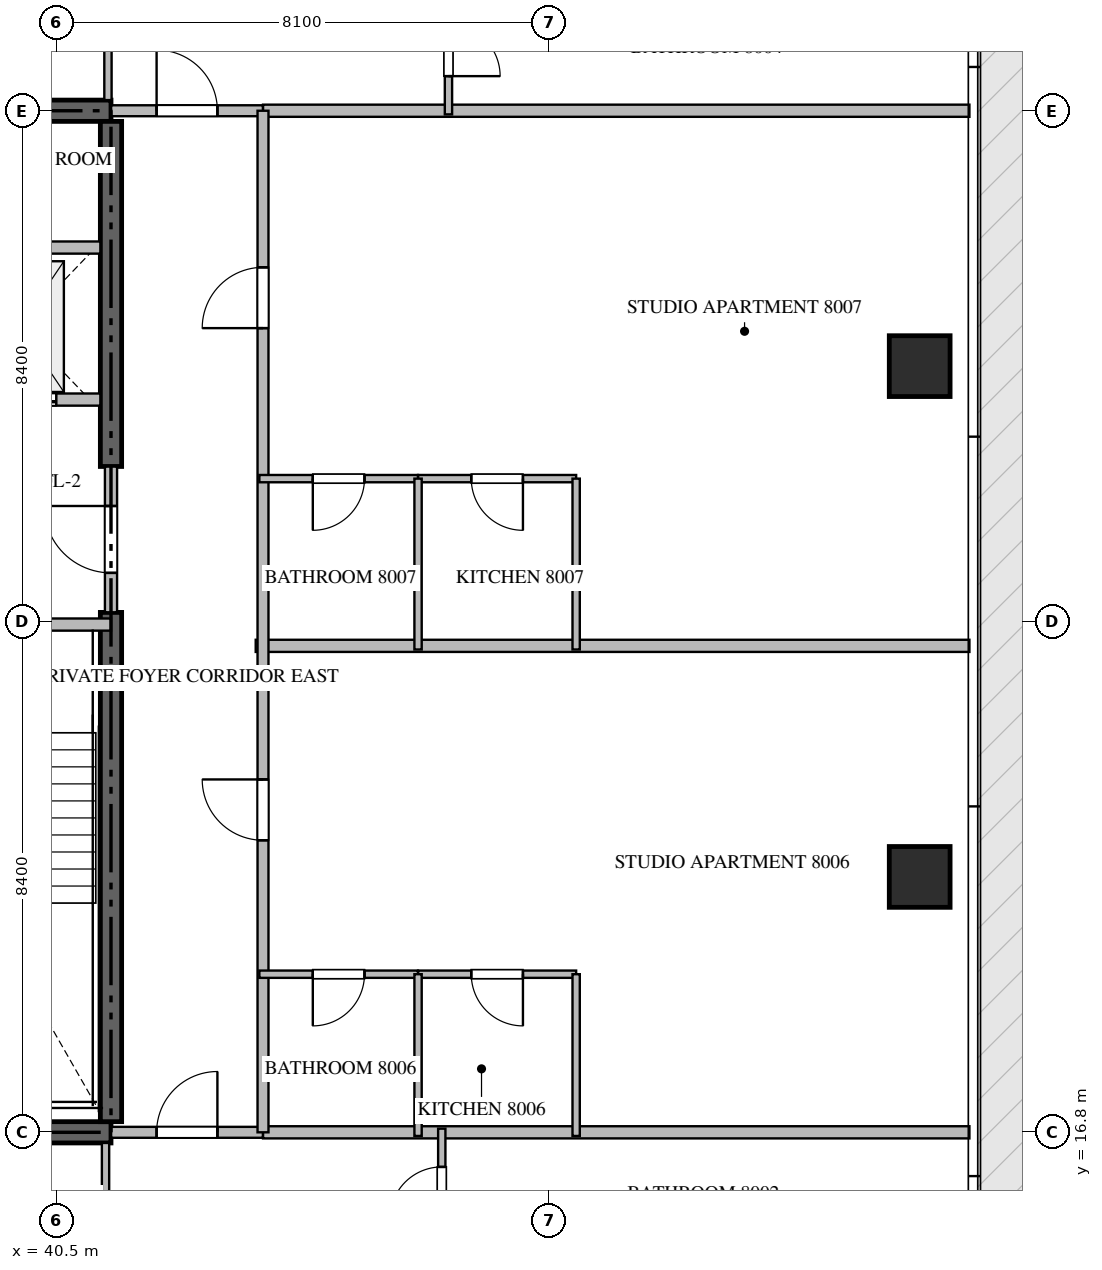
"""IFC4 building model, lengths in metres.
Left out: names, types, materials, properties, quantities, classifications, styles, units other than length and angle.
Written with IfcOpenShell. Run it as: python <this file> out.ifc"""

import sys

from ifc_helpers import new_model, si_unit, direction, frame, frame_2d, origin, origin_2d, place, context, subcontext, project, spatial, rectangle, extrude, source, transform, mapped, element, fill, save


model = new_model("IFC4")
c1 = context("Model", 3, precision=1e-05, world=origin(), true_north=direction((0.0, 1.0)))
c2 = subcontext(c1, "Body", "Model", "MODEL_VIEW")
j1 = project(units=[si_unit("LENGTHUNIT", "METRE"), si_unit("PLANEANGLEUNIT", "RADIAN")], contexts=[c1])
p1 = place(None, origin())
s1 = spatial("IfcSite", under=j1, at=p1, CompositionType="ELEMENT")
p2 = place(p1, origin())
s2 = spatial("IfcBuilding", under=s1, at=p2, CompositionType="ELEMENT")
p3 = place(p2, frame((0.0, 0.0, 321.8)))
s3 = spatial("IfcBuildingStorey", under=s2, at=p3, CompositionType="ELEMENT", Elevation=321.8)
for number, where, z_axis, x_axis in (
    (1, (23.4, 16.8, -0.26), (0.0, 0.0, 1.0), (1.0, 0.0, 0.0)),
    (2, (41.4, 33.6, -0.26), (0.0, 0.0, 1.0), (-1.0, 0.0, 0.0)),
):
    element("IfcWall", number, at=place(p3, frame(where, z_axis=z_axis, x_axis=x_axis)), inside=s3, PredefinedType="SHEAR", context=c2, shape_type="SweptSolid", body=[
        extrude(rectangle(XDim=18.0, YDim=0.35, at=frame_2d((9.0, 0.0))), origin(), (0.0, 0.0, 1.0), 4.048),
    ])
p4 = place(p3, frame((41.4, 16.975, -0.26), z_axis=(0.0, 0.0, 1.0), x_axis=(0.0, 1.0, 0.0)))
e3 = element("IfcWall", 3, at=p4, inside=s3, PredefinedType="SHEAR", context=c2, shape_type="SweptSolid", body=[
    extrude(rectangle(XDim=8.375, YDim=0.35, at=frame_2d((4.188, 0.0))), origin(), (0.0, 0.0, 1.0), 4.048),
])
p5 = place(p3, frame((41.4, 27.75, -0.26), z_axis=(0.0, 0.0, 1.0), x_axis=(0.0, 1.0, 0.0)))
e4 = element("IfcWall", 4, at=p5, inside=s3, PredefinedType="SHEAR", context=c2, shape_type="SweptSolid", body=[
    extrude(rectangle(XDim=5.675, YDim=0.35, at=frame_2d((2.837, 0.0))), origin(), (0.0, 0.0, 1.0), 4.048),
])
m1 = source(origin(), c2, "Body", "SweptSolid", [
    extrude(rectangle(XDim=1.0, YDim=1.0, at=origin_2d()), origin(), (0.0, 0.0, 1.0), 4.05),
])
for number, where, z_axis, x_axis in (
    (5, (54.7, 21.0, -0.26), (0.0, 0.0, 1.0), (1.0, 0.0, 0.0)),
    (6, (54.7, 29.4, -0.26), (0.0, 0.0, 1.0), (1.0, 0.0, 0.0)),
):
    element("IfcColumn", number, at=place(p3, frame(where, z_axis=z_axis, x_axis=x_axis)), inside=s3, PredefinedType="COLUMN", context=c2, shape_type="MappedRepresentation", body=[
        mapped(m1, transform((0.0, 0.0, 0.0), scale=1.0)),
    ])
p6 = place(p3, frame((36.95, 25.15, 0.0), z_axis=(0.0, 0.0, 1.0), x_axis=(1.0, 0.0, 0.0)))
e7 = element("IfcWall", 7, at=p6, inside=s3, PredefinedType="STANDARD", context=c2, shape_type="SweptSolid", body=[
    extrude(rectangle(XDim=4.45, YDim=0.2, at=frame_2d((2.225, 0.0))), origin(), (0.0, 0.0, 1.0), 3.79),
])
p7 = place(p6, frame((1.65, 0.0, 0.0)))
e8 = element("IfcOpeningElement", 8, at=p7, cuts=e7, PredefinedType="OPENING", context=c2, shape_type="SweptSolid", body=[
    extrude(rectangle(XDim=1.1, YDim=2.15, at=frame_2d((0.55, 1.075))), frame((0.0, 0.11, 0.0), z_axis=(0.0, -1.0, 0.0), x_axis=(1.0, 0.0, 0.0)), (0.0, 0.0, 1.0), 0.22),
])
p8 = place(p3, frame((38.75, 28.85, 0.0), z_axis=(0.0, 0.0, 1.0), x_axis=(1.0, 0.0, 0.0)))
e9 = element("IfcWall", 9, at=p8, inside=s3, PredefinedType="STANDARD", context=c2, shape_type="SweptSolid", body=[
    extrude(rectangle(XDim=2.475, YDim=0.2, at=frame_2d((1.238, 0.0))), origin(), (0.0, 0.0, 1.0), 3.79),
])
p9 = place(p8, frame((0.55, 0.0, 0.0)))
e10 = element("IfcOpeningElement", 10, at=p9, cuts=e9, PredefinedType="OPENING", context=c2, shape_type="SweptSolid", body=[
    extrude(rectangle(XDim=1.2, YDim=2.2, at=frame_2d((0.6, 1.1))), frame((0.0, 0.11, 0.0), z_axis=(0.0, -1.0, 0.0), x_axis=(1.0, 0.0, 0.0)), (0.0, 0.0, 1.0), 0.22),
])
p10 = place(p3, frame((38.75, 31.35, 0.0), z_axis=(0.0, 0.0, 1.0), x_axis=(1.0, 0.0, 0.0)))
e11 = element("IfcWall", 11, at=p10, inside=s3, PredefinedType="STANDARD", context=c2, shape_type="SweptSolid", body=[
    extrude(rectangle(XDim=2.475, YDim=0.2, at=frame_2d((1.238, 0.0))), origin(), (0.0, 0.0, 1.0), 3.79),
])
p11 = place(p3, frame((41.4, 25.352, 0.0), z_axis=(0.0, 0.0, 1.0), x_axis=(0.0, 1.0, 0.0)))
e12 = element("IfcWall", 12, at=p11, inside=s3, PredefinedType="STANDARD", context=c2, shape_type="SweptSolid", body=[
    extrude(rectangle(XDim=2.396, YDim=0.2, at=frame_2d((1.198, 0.0))), origin(), (0.0, 0.0, 1.0), 3.79),
])
p12 = place(p11, frame((0.648, 0.0, 0.0)))
e13 = element("IfcOpeningElement", 13, at=p12, cuts=e12, PredefinedType="OPENING", context=c2, shape_type="SweptSolid", body=[
    extrude(rectangle(XDim=1.1, YDim=2.15, at=frame_2d((0.55, 1.075))), frame((0.0, 0.11, 0.0), z_axis=(0.0, -1.0, 0.0), x_axis=(1.0, 0.0, 0.0)), (0.0, 0.0, 1.0), 0.22),
])
p13 = place(p3, frame((43.78, 24.8, 0.0), z_axis=(0.0, 0.0, 1.0), x_axis=(1.0, 0.0, 0.0)))
e14 = element("IfcWall", 14, at=p13, inside=s3, PredefinedType="PARTITIONING", context=c2, shape_type="SweptSolid", body=[
    extrude(rectangle(XDim=11.738, YDim=0.2, at=frame_2d((5.869, 0.0))), origin(), (0.0, 0.0, 1.0), 3.79),
])
for number, where, z_axis, x_axis in (
    (15, (43.9, 16.8, 0.0), (0.0, 0.0, 1.0), (1.0, 0.0, 0.0)),
    (16, (43.9, 33.6, 0.0), (0.0, 0.0, 1.0), (1.0, 0.0, 0.0)),
):
    element("IfcWall", number, at=place(p3, frame(where, z_axis=z_axis, x_axis=x_axis)), inside=s3, PredefinedType="PARTITIONING", context=c2, shape_type="SweptSolid", body=[
        extrude(rectangle(XDim=11.618, YDim=0.2, at=frame_2d((5.809, 0.0))), origin(), (0.0, 0.0, 1.0), 3.79),
    ])
p14 = place(p3, frame((41.402, 16.8, 0.0), z_axis=(0.0, 0.0, 1.0), x_axis=(1.0, 0.0, 0.0)))
e17 = element("IfcWall", 17, at=p14, inside=s3, PredefinedType="PARTITIONING", context=c2, shape_type="SweptSolid", body=[
    extrude(rectangle(XDim=2.496, YDim=0.18, at=frame_2d((1.248, 0.0))), origin(), (0.0, 0.0, 1.0), 3.79),
])
p15 = place(p14, frame((0.748, 0.0, 0.0)))
e18 = element("IfcOpeningElement", 18, at=p15, cuts=e17, PredefinedType="OPENING", context=c2, shape_type="SweptSolid", body=[
    extrude(rectangle(XDim=1.0, YDim=2.15, at=frame_2d((0.5, 1.075))), frame((0.0, 0.1, 0.0), z_axis=(0.0, -1.0, 0.0), x_axis=(1.0, 0.0, 0.0)), (0.0, 0.0, 1.0), 0.2),
])
p16 = place(p3, frame((41.402, 33.6, 0.0), z_axis=(0.0, 0.0, 1.0), x_axis=(1.0, 0.0, 0.0)))
e19 = element("IfcWall", 19, at=p16, inside=s3, PredefinedType="PARTITIONING", context=c2, shape_type="SweptSolid", body=[
    extrude(rectangle(XDim=2.496, YDim=0.18, at=frame_2d((1.248, 0.0))), origin(), (0.0, 0.0, 1.0), 3.79),
])
p17 = place(p16, frame((0.748, 0.0, 0.0)))
e20 = element("IfcOpeningElement", 20, at=p17, cuts=e19, PredefinedType="OPENING", context=c2, shape_type="SweptSolid", body=[
    extrude(rectangle(XDim=1.0, YDim=2.15, at=frame_2d((0.5, 1.075))), frame((0.0, 0.1, 0.0), z_axis=(0.0, -1.0, 0.0), x_axis=(1.0, 0.0, 0.0)), (0.0, 0.0, 1.0), 0.2),
])
p18 = place(p3, frame((43.9, 16.8, 0.0), z_axis=(0.0, 0.0, 1.0), x_axis=(0.0, 1.0, 0.0)))
e21 = element("IfcWall", 21, at=p18, inside=s3, PredefinedType="PARTITIONING", context=c2, shape_type="SweptSolid", body=[
    extrude(rectangle(XDim=16.8, YDim=0.18, at=frame_2d((8.4, 0.0))), origin(), (0.0, 0.0, 1.0), 3.79),
])
p19 = place(p18, frame((4.803, 0.0, 0.0)))
e22 = element("IfcOpeningElement", 22, at=p19, cuts=e21, PredefinedType="OPENING", context=c2, shape_type="SweptSolid", body=[
    extrude(rectangle(XDim=1.0, YDim=2.15, at=frame_2d((0.5, 1.075))), frame((0.0, 0.1, 0.0), z_axis=(0.0, -1.0, 0.0), x_axis=(1.0, 0.0, 0.0)), (0.0, 0.0, 1.0), 0.2),
])
p20 = place(p18, frame((13.225, 0.0, 0.0)))
e23 = element("IfcOpeningElement", 23, at=p20, cuts=e21, PredefinedType="OPENING", context=c2, shape_type="SweptSolid", body=[
    extrude(rectangle(XDim=1.0, YDim=2.15, at=frame_2d((0.5, 1.075))), frame((0.0, 0.1, 0.0), z_axis=(0.0, -1.0, 0.0), x_axis=(1.0, 0.0, 0.0)), (0.0, 0.0, 1.0), 0.2),
])
p21 = place(p3, frame((41.31, 14.05, 0.0), z_axis=(0.0, 0.0, 1.0), x_axis=(0.0, 1.0, 0.0)))
e24 = element("IfcWall", 24, at=p21, inside=s3, PredefinedType="PARTITIONING", context=c2, shape_type="SweptSolid", body=[
    extrude(rectangle(XDim=2.575, YDim=0.12, at=frame_2d((1.288, 0.0))), origin(), (0.0, 0.0, 1.0), 3.79),
])
p22 = place(p3, frame((46.84, 14.752, 0.0), z_axis=(0.0, 0.0, 1.0), x_axis=(0.0, 1.0, 0.0)))
e25 = element("IfcWall", 25, at=p22, inside=s3, PredefinedType="PARTITIONING", context=c2, shape_type="SweptSolid", body=[
    extrude(rectangle(XDim=2.108, YDim=0.12, at=frame_2d((1.054, 0.0))), origin(), (0.0, 0.0, 1.0), 3.79),
])
p23 = place(p22, frame((0.629, 0.0, 0.0)))
e26 = element("IfcOpeningElement", 26, at=p23, cuts=e25, PredefinedType="OPENING", context=c2, shape_type="SweptSolid", body=[
    extrude(rectangle(XDim=0.85, YDim=2.1, at=frame_2d((0.425, 1.05))), frame((0.0, 0.07, 0.0), z_axis=(0.0, -1.0, 0.0), x_axis=(1.0, 0.0, 0.0)), (0.0, 0.0, 1.0), 0.14),
])
p24 = place(p3, frame((41.35, 36.35, 0.0), z_axis=(0.0, 0.0, 1.0), x_axis=(0.0, -1.0, 0.0)))
e27 = element("IfcWall", 27, at=p24, inside=s3, PredefinedType="PARTITIONING", context=c2, shape_type="SweptSolid", body=[
    extrude(rectangle(XDim=2.575, YDim=0.12, at=frame_2d((1.288, 0.0))), origin(), (0.0, 0.0, 1.0), 3.79),
])
p25 = place(p3, frame((46.95, 35.648, 0.0), z_axis=(0.0, 0.0, 1.0), x_axis=(0.0, -1.0, 0.0)))
e28 = element("IfcWall", 28, at=p25, inside=s3, PredefinedType="PARTITIONING", context=c2, shape_type="SweptSolid", body=[
    extrude(rectangle(XDim=2.108, YDim=0.12, at=frame_2d((1.054, 0.0))), origin(), (0.0, 0.0, 1.0), 3.372),
])
p26 = place(p25, frame((0.629, 0.0, 0.0)))
e29 = element("IfcOpeningElement", 29, at=p26, cuts=e28, PredefinedType="OPENING", context=c2, shape_type="SweptSolid", body=[
    extrude(rectangle(XDim=0.85, YDim=2.1, at=frame_2d((0.425, 1.05))), frame((0.0, 0.07, 0.0), z_axis=(0.0, -1.0, 0.0), x_axis=(1.0, 0.0, 0.0)), (0.0, 0.0, 1.0), 0.14),
])
p27 = place(p3, frame((49.05, 19.4, 0.0), z_axis=(0.0, 0.0, 1.0), x_axis=(-1.0, 0.0, 0.0)))
e30 = element("IfcWall", 30, at=p27, inside=s3, PredefinedType="PARTITIONING", context=c2, shape_type="SweptSolid", body=[
    extrude(rectangle(XDim=2.6, YDim=0.12, at=frame_2d((1.3, 0.0))), origin(), (0.0, 0.0, 1.0), 3.79),
])
p28 = place(p27, frame((0.875, 0.0, 0.0)))
e31 = element("IfcOpeningElement", 31, at=p28, cuts=e30, PredefinedType="OPENING", context=c2, shape_type="SweptSolid", body=[
    extrude(rectangle(XDim=0.85, YDim=2.1, at=frame_2d((0.425, 1.05))), frame((0.0, 0.07, 0.0), z_axis=(0.0, -1.0, 0.0), x_axis=(1.0, 0.0, 0.0)), (0.0, 0.0, 1.0), 0.14),
])
p29 = place(p3, frame((46.448, 19.4, 0.0), z_axis=(0.0, 0.0, 1.0), x_axis=(-1.0, 0.0, 0.0)))
e32 = element("IfcWall", 32, at=p29, inside=s3, PredefinedType="PARTITIONING", context=c2, shape_type="SweptSolid", body=[
    extrude(rectangle(XDim=2.608, YDim=0.12, at=frame_2d((1.304, 0.0))), origin(), (0.0, 0.0, 1.0), 3.79),
])
p30 = place(p29, frame((0.879, 0.0, 0.0)))
e33 = element("IfcOpeningElement", 33, at=p30, cuts=e32, PredefinedType="OPENING", context=c2, shape_type="SweptSolid", body=[
    extrude(rectangle(XDim=0.85, YDim=2.1, at=frame_2d((0.425, 1.05))), frame((0.0, 0.07, 0.0), z_axis=(0.0, -1.0, 0.0), x_axis=(1.0, 0.0, 0.0)), (0.0, 0.0, 1.0), 0.14),
])
for number, where, z_axis, x_axis in (
    (34, (46.45, 16.74, 0.0), (0.0, 0.0, 1.0), (0.0, 1.0, 0.0)),
    (35, (49.05, 16.74, 0.0), (0.0, 0.0, 1.0), (0.0, 1.0, 0.0)),
):
    element("IfcWall", number, at=place(p3, frame(where, z_axis=z_axis, x_axis=x_axis)), inside=s3, PredefinedType="PARTITIONING", context=c2, shape_type="SweptSolid", body=[
        extrude(rectangle(XDim=2.66, YDim=0.12, at=frame_2d((1.33, 0.0))), origin(), (0.0, 0.0, 1.0), 3.79),
    ])
p31 = place(p3, frame((49.05, 27.55, 0.0), z_axis=(0.0, 0.0, 1.0), x_axis=(-1.0, 0.0, 0.0)))
e36 = element("IfcWall", 36, at=p31, inside=s3, PredefinedType="PARTITIONING", context=c2, shape_type="SweptSolid", body=[
    extrude(rectangle(XDim=2.6, YDim=0.12, at=frame_2d((1.3, 0.0))), origin(), (0.0, 0.0, 1.0), 3.79),
])
p32 = place(p31, frame((0.875, 0.0, 0.0)))
e37 = element("IfcOpeningElement", 37, at=p32, cuts=e36, PredefinedType="OPENING", context=c2, shape_type="SweptSolid", body=[
    extrude(rectangle(XDim=0.85, YDim=2.1, at=frame_2d((0.425, 1.05))), frame((0.0, 0.07, 0.0), z_axis=(0.0, -1.0, 0.0), x_axis=(1.0, 0.0, 0.0)), (0.0, 0.0, 1.0), 0.14),
])
p33 = place(p3, frame((46.448, 27.55, 0.0), z_axis=(0.0, 0.0, 1.0), x_axis=(-1.0, 0.0, 0.0)))
e38 = element("IfcWall", 38, at=p33, inside=s3, PredefinedType="PARTITIONING", context=c2, shape_type="SweptSolid", body=[
    extrude(rectangle(XDim=2.608, YDim=0.12, at=frame_2d((1.304, 0.0))), origin(), (0.0, 0.0, 1.0), 3.79),
])
p34 = place(p33, frame((0.879, 0.0, 0.0)))
e39 = element("IfcOpeningElement", 39, at=p34, cuts=e38, PredefinedType="OPENING", context=c2, shape_type="SweptSolid", body=[
    extrude(rectangle(XDim=0.85, YDim=2.1, at=frame_2d((0.425, 1.05))), frame((0.0, 0.07, 0.0), z_axis=(0.0, -1.0, 0.0), x_axis=(1.0, 0.0, 0.0)), (0.0, 0.0, 1.0), 0.14),
])
for number, where, z_axis, x_axis in (
    (40, (46.45, 24.74, 0.0), (0.0, 0.0, 1.0), (0.0, 1.0, 0.0)),
    (41, (49.05, 24.74, 0.0), (0.0, 0.0, 1.0), (0.0, 1.0, 0.0)),
):
    element("IfcWall", number, at=place(p3, frame(where, z_axis=z_axis, x_axis=x_axis)), inside=s3, PredefinedType="PARTITIONING", context=c2, shape_type="SweptSolid", body=[
        extrude(rectangle(XDim=2.81, YDim=0.12, at=frame_2d((1.405, 0.0))), origin(), (0.0, 0.0, 1.0), 3.79),
    ])
m2 = source(origin(), c2, "Body", "SweptSolid", [
    extrude(rectangle(XDim=1.2, YDim=2.2, at=frame_2d((0.6, 1.1))), frame((0.0, 0.025, 0.0), z_axis=(0.0, -1.0, 0.0), x_axis=(1.0, 0.0, 0.0)), (0.0, 0.0, 1.0), 0.05),
])
p35 = place(p9, origin())
e42 = element("IfcDoor", 42, at=p35, inside=s3, OperationType="DOUBLE_DOOR_SLIDING", PredefinedType="DOOR", context=c2, shape_type="MappedRepresentation", body=[
    mapped(m2, transform((0.0, 0.0, 0.0), scale=1.0)),
])
fill(e10, e42)
m3 = source(origin(), c2, "Body", "SweptSolid", [
    extrude(rectangle(XDim=1.1, YDim=2.15, at=frame_2d((0.55, 1.075))), frame((0.0, 0.025, 0.0), z_axis=(0.0, -1.0, 0.0), x_axis=(1.0, 0.0, 0.0)), (0.0, 0.0, 1.0), 0.05),
])
p36 = place(p12, origin())
e43 = element("IfcDoor", 43, at=p36, inside=s3, OperationType="SINGLE_SWING_RIGHT", PredefinedType="DOOR", context=c2, shape_type="MappedRepresentation", body=[
    mapped(m3, transform((0.0, 0.0, 0.0), scale=1.0)),
])
fill(e13, e43)
m4 = source(origin(), c2, "Body", "SweptSolid", [
    extrude(rectangle(XDim=1.0, YDim=2.15, at=frame_2d((0.5, 1.075))), frame((0.0, 0.025, 0.0), z_axis=(0.0, -1.0, 0.0), x_axis=(1.0, 0.0, 0.0)), (0.0, 0.0, 1.0), 0.05),
])
p37 = place(p15, origin())
e44 = element("IfcDoor", 44, at=p37, inside=s3, OperationType="SINGLE_SWING_RIGHT", PredefinedType="DOOR", context=c2, shape_type="MappedRepresentation", body=[
    mapped(m4, transform((0.0, 0.0, 0.0), scale=1.0)),
])
fill(e18, e44)
p38 = place(p17, origin())
e45 = element("IfcDoor", 45, at=p38, inside=s3, OperationType="SINGLE_SWING_LEFT", PredefinedType="DOOR", context=c2, shape_type="MappedRepresentation", body=[
    mapped(m4, transform((0.0, 0.0, 0.0), scale=1.0)),
])
fill(e20, e45)
p39 = place(p19, origin())
e46 = element("IfcDoor", 46, at=p39, inside=s3, OperationType="SINGLE_SWING_RIGHT", PredefinedType="DOOR", context=c2, shape_type="MappedRepresentation", body=[
    mapped(m4, transform((0.0, 0.0, 0.0), scale=1.0)),
])
fill(e22, e46)
p40 = place(p20, origin())
e47 = element("IfcDoor", 47, at=p40, inside=s3, OperationType="SINGLE_SWING_LEFT", PredefinedType="DOOR", context=c2, shape_type="MappedRepresentation", body=[
    mapped(m4, transform((0.0, 0.0, 0.0), scale=1.0)),
])
fill(e23, e47)
m5 = source(origin(), c2, "Body", "SweptSolid", [
    extrude(rectangle(XDim=0.85, YDim=2.1, at=frame_2d((0.425, 1.05))), frame((0.0, 0.025, 0.0), z_axis=(0.0, -1.0, 0.0), x_axis=(1.0, 0.0, 0.0)), (0.0, 0.0, 1.0), 0.05),
])
p41 = place(p23, origin())
e48 = element("IfcDoor", 48, at=p41, inside=s3, OperationType="SINGLE_SWING_LEFT", PredefinedType="DOOR", context=c2, shape_type="MappedRepresentation", body=[
    mapped(m5, transform((0.0, 0.0, 0.0), scale=1.0)),
])
fill(e26, e48)
p42 = place(p26, origin())
e49 = element("IfcDoor", 49, at=p42, inside=s3, OperationType="SINGLE_SWING_RIGHT", PredefinedType="DOOR", context=c2, shape_type="MappedRepresentation", body=[
    mapped(m5, transform((0.0, 0.0, 0.0), scale=1.0)),
])
fill(e29, e49)
p43 = place(p28, origin())
e50 = element("IfcDoor", 50, at=p43, inside=s3, OperationType="SINGLE_SWING_LEFT", PredefinedType="DOOR", context=c2, shape_type="MappedRepresentation", body=[
    mapped(m5, transform((0.0, 0.0, 0.0), scale=1.0)),
])
fill(e31, e50)
p44 = place(p30, origin())
e51 = element("IfcDoor", 51, at=p44, inside=s3, OperationType="SINGLE_SWING_RIGHT", PredefinedType="DOOR", context=c2, shape_type="MappedRepresentation", body=[
    mapped(m5, transform((0.0, 0.0, 0.0), scale=1.0)),
])
fill(e33, e51)
p45 = place(p32, origin())
e52 = element("IfcDoor", 52, at=p45, inside=s3, OperationType="SINGLE_SWING_LEFT", PredefinedType="DOOR", context=c2, shape_type="MappedRepresentation", body=[
    mapped(m5, transform((0.0, 0.0, 0.0), scale=1.0)),
])
fill(e37, e52)
p46 = place(p34, origin())
e53 = element("IfcDoor", 53, at=p46, inside=s3, OperationType="SINGLE_SWING_RIGHT", PredefinedType="DOOR", context=c2, shape_type="MappedRepresentation", body=[
    mapped(m5, transform((0.0, 0.0, 0.0), scale=1.0)),
])
fill(e39, e53)
save(model, sys.argv[1])
